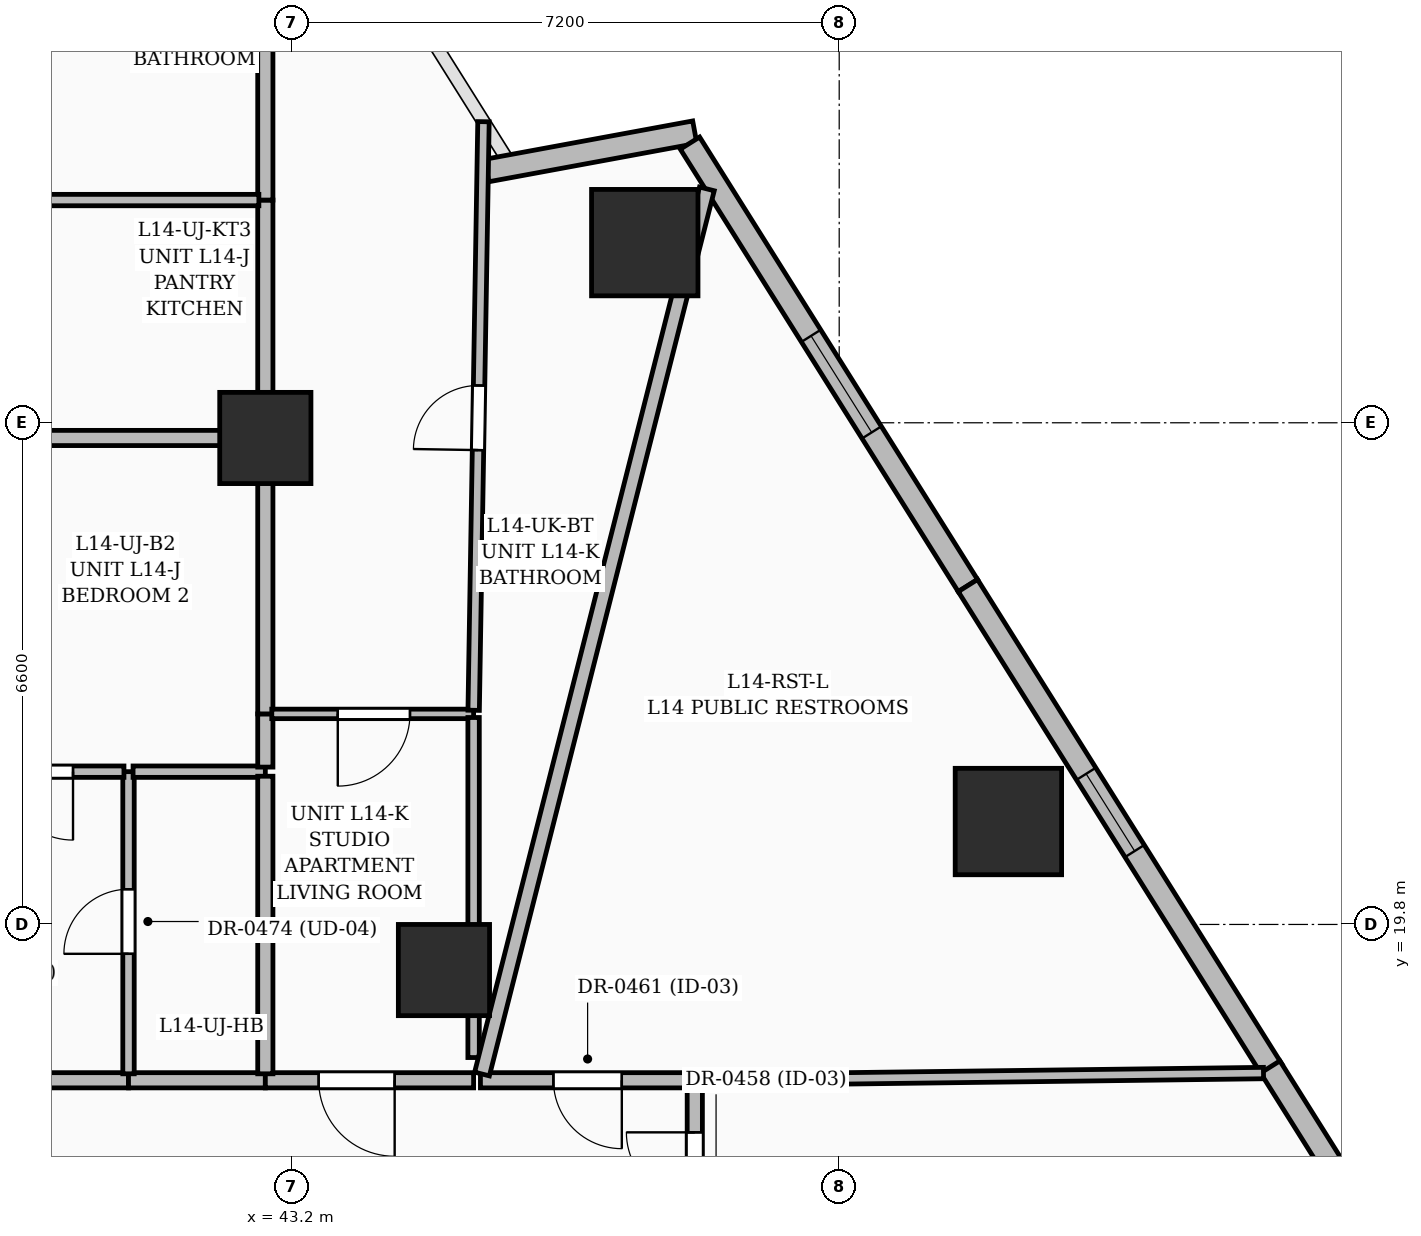
"""IFC4 building model, lengths in metres.
Left out: names, types, materials, properties, quantities, classifications, styles, units other than length and angle.
Written with IfcOpenShell. Run it as: python <this file> out.ifc"""

import sys

from ifc_helpers import new_model, si_unit, direction, frame, frame_2d, origin, origin_2d, place, context, subcontext, project, spatial, rectangle, extrude, element, fill, save


model = new_model("IFC4")
c1 = context("Model", 3, precision=1e-05, world=origin(), true_north=direction((0.0, 1.0)))
c2 = subcontext(c1, "Body", "Model", "MODEL_VIEW")
j1 = project(units=[si_unit("LENGTHUNIT", "METRE"), si_unit("PLANEANGLEUNIT", "RADIAN")], contexts=[c1])
p1 = place(None, origin())
s1 = spatial("IfcSite", under=j1, at=p1, CompositionType="ELEMENT")
p2 = place(p1, origin())
s2 = spatial("IfcBuilding", under=s1, at=p2, CompositionType="ELEMENT")
p3 = place(p2, frame((0.0, 0.0, 60.6)))
s3 = spatial("IfcBuildingStorey", under=s2, at=p3, CompositionType="ELEMENT", Elevation=60.6)
for number, where, z_axis, x_axis in (
    (1, (45.2, 19.2, 0.0), (0.0, 0.0, 1.0), (1.0, 0.0, 0.0)),
    (2, (42.85, 26.2, 0.0), (0.0, 0.0, 1.0), (1.0, 0.0, 0.0)),
):
    element("IfcColumn", number, at=place(p3, frame(where, z_axis=z_axis, x_axis=x_axis)), inside=s3, PredefinedType="COLUMN", context=c2, shape_type="SweptSolid", body=[
        extrude(rectangle(XDim=1.2, YDim=1.2, at=origin_2d()), origin(), (0.0, 0.0, 1.0), 3.6),
    ])
for number, where, z_axis, x_axis in (
    (3, (52.626, 21.154, 0.0), (0.0, 0.0, 1.0), (1.0, 0.0, 0.0)),
    (4, (47.842, 28.77, 0.0), (0.0, 0.0, 1.0), (1.0, 0.0, 0.0)),
):
    element("IfcColumn", number, at=place(p3, frame(where, z_axis=z_axis, x_axis=x_axis)), inside=s3, PredefinedType="COLUMN", context=c2, shape_type="SweptSolid", body=[
        extrude(rectangle(XDim=1.4, YDim=1.4, at=origin_2d()), origin(), (0.0, 0.0, 1.0), 3.6),
    ])
p4 = place(p3, frame((45.763, 29.719, 0.0), z_axis=(0.0, 0.0, 1.0), x_axis=(0.983400490727, 0.181448270416, 0.0)))
e5 = element("IfcWall", 5, at=p4, inside=s3, PredefinedType="SOLIDWALL", context=c2, shape_type="SweptSolid", body=[
    extrude(rectangle(XDim=2.782, YDim=0.3, at=frame_2d((1.391, 0.0))), origin(), (0.0, 0.0, 1.0), 2.375),
])
p5 = place(p3, frame((48.436, 30.08, 0.0), z_axis=(0.0, 0.0, 1.0), x_axis=(0.531916220619, -0.846796985258, 0.0)))
e6 = element("IfcWall", 6, at=p5, inside=s3, PredefinedType="SOLIDWALL", context=c2, shape_type="SweptSolid", body=[
    extrude(rectangle(XDim=6.874, YDim=0.3, at=frame_2d((3.437, 0.0))), origin(), (0.0, 0.0, 1.0), 3.35),
])
p6 = place(p5, frame((2.995, 0.0, 0.6)))
e7 = element("IfcOpeningElement", 7, at=p6, cuts=e6, PredefinedType="OPENING", context=c2, shape_type="SweptSolid", body=[
    extrude(rectangle(XDim=1.5, YDim=2.1, at=frame_2d((0.75, 1.05))), frame((0.0, 0.16, 0.0), z_axis=(0.0, -1.0, 0.0), x_axis=(1.0, 0.0, 0.0)), (0.0, 0.0, 1.0), 0.32),
])
p7 = place(p3, frame((52.093, 24.259, 0.0), z_axis=(0.0, 0.0, 1.0), x_axis=(0.531905989854, -0.846803411635, 0.0)))
e8 = element("IfcWall", 8, at=p7, inside=s3, PredefinedType="SOLIDWALL", context=c2, shape_type="SweptSolid", body=[
    extrude(rectangle(XDim=7.532, YDim=0.3, at=frame_2d((3.766, 0.0))), origin(), (0.0, 0.0, 1.0), 3.35),
])
p8 = place(p7, frame((2.925, 0.0, 0.8)))
e9 = element("IfcOpeningElement", 9, at=p8, cuts=e8, PredefinedType="OPENING", context=c2, shape_type="SweptSolid", body=[
    extrude(rectangle(XDim=1.2, YDim=1.8, at=frame_2d((0.6, 0.9))), frame((0.0, 0.16, 0.0), z_axis=(0.0, -1.0, 0.0), x_axis=(1.0, 0.0, 0.0)), (0.0, 0.0, 1.0), 0.32),
])
p9 = place(p3, frame((56.071, 17.925, 0.0), z_axis=(0.0, 0.0, 1.0), x_axis=(0.531906470689, -0.846803109607, 0.0)))
e10 = element("IfcWall", 10, at=p9, inside=s3, PredefinedType="SOLIDWALL", context=c2, shape_type="SweptSolid", body=[
    extrude(rectangle(XDim=6.829, YDim=0.3, at=frame_2d((3.415, 0.0))), origin(), (0.0, 0.0, 1.0), 3.35),
])
p10 = place(p9, frame((2.0, 0.0, 0.6)))
e11 = element("IfcOpeningElement", 11, at=p10, cuts=e10, PredefinedType="OPENING", context=c2, shape_type="SweptSolid", body=[
    extrude(rectangle(XDim=2.4, YDim=2.1, at=frame_2d((1.2, 1.05))), frame((0.0, 0.16, 0.0), z_axis=(0.0, -1.0, 0.0), x_axis=(1.0, 0.0, 0.0)), (0.0, 0.0, 1.0), 0.32),
])
p11 = place(p3, frame((48.5, 15.48, 0.0), z_axis=(0.0, 0.0, 1.0), x_axis=(0.0, 1.0, 0.0)))
e12 = element("IfcWall", 12, at=p11, inside=s3, PredefinedType="PARTITIONING", context=c2, shape_type="SweptSolid", body=[
    extrude(rectangle(XDim=2.27, YDim=0.2, at=frame_2d((1.135, 0.0))), origin(), (0.0, 0.0, 1.0), 2.279),
])
p12 = place(p11, frame((0.685, 0.0, 0.0)))
e13 = element("IfcOpeningElement", 13, at=p12, cuts=e12, PredefinedType="OPENING", context=c2, shape_type="SweptSolid", body=[
    extrude(rectangle(XDim=0.9, YDim=2.1, at=frame_2d((0.45, 1.05))), frame((0.0, 0.11, 0.0), z_axis=(0.0, -1.0, 0.0), x_axis=(1.0, 0.0, 0.0)), (0.0, 0.0, 1.0), 0.22),
])
p13 = place(p3, frame((41.05, 17.75, 0.0), z_axis=(0.0, 0.0, 1.0), x_axis=(-1.0, 0.0, 0.0)))
e14 = element("IfcWall", 14, at=p13, inside=s3, PredefinedType="PARTITIONING", context=c2, shape_type="SweptSolid", body=[
    extrude(rectangle(XDim=5.48, YDim=0.2, at=frame_2d((2.74, 0.0))), origin(), (0.0, 0.0, 1.0), 3.35),
])
p14 = place(p13, frame((2.18, 0.0, 0.0)))
e15 = element("IfcOpeningElement", 15, at=p14, cuts=e14, PredefinedType="OPENING", context=c2, shape_type="SweptSolid", body=[
    extrude(rectangle(XDim=1.0, YDim=2.2, at=frame_2d((0.5, 1.1))), frame((0.0, 0.11, 0.0), z_axis=(0.0, -1.0, 0.0), x_axis=(1.0, 0.0, 0.0)), (0.0, 0.0, 1.0), 0.22),
])
p15 = place(p3, frame((42.85, 17.75, 0.0), z_axis=(0.0, 0.0, 1.0), x_axis=(-1.0, 0.0, 0.0)))
e16 = element("IfcWall", 16, at=p15, inside=s3, PredefinedType="PARTITIONING", context=c2, shape_type="SweptSolid", body=[
    extrude(rectangle(XDim=1.8, YDim=0.2, at=frame_2d((0.9, 0.0))), origin(), (0.0, 0.0, 1.0), 3.35),
])
p16 = place(p3, frame((45.59, 17.75, 0.0), z_axis=(0.0, 0.0, 1.0), x_axis=(-1.0, 0.0, 0.0)))
e17 = element("IfcWall", 17, at=p16, inside=s3, PredefinedType="PARTITIONING", context=c2, shape_type="SweptSolid", body=[
    extrude(rectangle(XDim=2.74, YDim=0.2, at=frame_2d((1.37, 0.0))), origin(), (0.0, 0.0, 1.0), 2.309),
])
p17 = place(p16, frame((1.039, 0.0, 0.0)))
e18 = element("IfcOpeningElement", 18, at=p17, cuts=e17, PredefinedType="OPENING", context=c2, shape_type="SweptSolid", body=[
    extrude(rectangle(XDim=1.0, YDim=2.2, at=frame_2d((0.5, 1.1))), frame((0.0, 0.11, 0.0), z_axis=(0.0, -1.0, 0.0), x_axis=(1.0, 0.0, 0.0)), (0.0, 0.0, 1.0), 0.22),
])
p18 = place(p3, frame((48.415, 17.75, 0.0), z_axis=(0.0, 0.0, 1.0), x_axis=(-1.0, 0.0, 0.0)))
e19 = element("IfcWall", 19, at=p18, inside=s3, PredefinedType="PARTITIONING", context=c2, shape_type="SweptSolid", body=[
    extrude(rectangle(XDim=2.735, YDim=0.2, at=frame_2d((1.368, 0.0))), origin(), (0.0, 0.0, 1.0), 2.309),
])
p19 = place(p18, frame((0.875, 0.0, 0.0)))
e20 = element("IfcOpeningElement", 20, at=p19, cuts=e19, PredefinedType="OPENING", context=c2, shape_type="SweptSolid", body=[
    extrude(rectangle(XDim=0.9, YDim=2.1, at=frame_2d((0.45, 1.05))), frame((0.0, 0.11, 0.0), z_axis=(0.0, -1.0, 0.0), x_axis=(1.0, 0.0, 0.0)), (0.0, 0.0, 1.0), 0.22),
])
p20 = place(p3, frame((55.982, 17.845, 0.0), z_axis=(0.0, 0.0, 1.0), x_axis=(-0.999919274462, -0.012706083592, 0.0)))
e21 = element("IfcWall", 21, at=p20, inside=s3, PredefinedType="PARTITIONING", context=c2, shape_type="SweptSolid", body=[
    extrude(rectangle(XDim=7.397, YDim=0.15, at=frame_2d((3.699, 0.0))), origin(), (0.0, 0.0, 1.0), 2.279),
])
p21 = place(p3, frame((41.05, 17.835, 0.0), z_axis=(0.0, 0.0, 1.0), x_axis=(0.0, 1.0, 0.0)))
e22 = element("IfcWall", 22, at=p21, inside=s3, PredefinedType="PARTITIONING", context=c2, shape_type="SweptSolid", body=[
    extrude(rectangle(XDim=3.975, YDim=0.15, at=frame_2d((1.988, 0.0))), origin(), (0.0, 0.0, 1.0), 3.35),
])
p22 = place(p21, frame((1.579, 0.0, 0.0)))
e23 = element("IfcOpeningElement", 23, at=p22, cuts=e22, PredefinedType="OPENING", context=c2, shape_type="SweptSolid", body=[
    extrude(rectangle(XDim=0.85, YDim=2.1, at=frame_2d((0.425, 1.05))), frame((0.0, 0.085, 0.0), z_axis=(0.0, -1.0, 0.0), x_axis=(1.0, 0.0, 0.0)), (0.0, 0.0, 1.0), 0.17),
])
p23 = place(p3, frame((40.99, 21.81, 0.0), z_axis=(0.0, 0.0, 1.0), x_axis=(-1.0, 0.0, 0.0)))
e24 = element("IfcWall", 24, at=p23, inside=s3, PredefinedType="PARTITIONING", context=c2, shape_type="SweptSolid", body=[
    extrude(rectangle(XDim=2.3, YDim=0.15, at=frame_2d((1.15, 0.0))), origin(), (0.0, 0.0, 1.0), 3.35),
])
p24 = place(p23, frame((0.67, 0.0, 0.0)))
e25 = element("IfcOpeningElement", 25, at=p24, cuts=e24, PredefinedType="OPENING", context=c2, shape_type="SweptSolid", body=[
    extrude(rectangle(XDim=0.9, YDim=2.15, at=frame_2d((0.45, 1.075))), frame((0.0, 0.085, 0.0), z_axis=(0.0, -1.0, 0.0), x_axis=(1.0, 0.0, 0.0)), (0.0, 0.0, 1.0), 0.17),
])
p25 = place(p3, frame((42.85, 21.81, 0.0), z_axis=(0.0, 0.0, 1.0), x_axis=(-1.0, 0.0, 0.0)))
e26 = element("IfcWall", 26, at=p25, inside=s3, PredefinedType="PARTITIONING", context=c2, shape_type="SweptSolid", body=[
    extrude(rectangle(XDim=1.74, YDim=0.15, at=frame_2d((0.87, 0.0))), origin(), (0.0, 0.0, 1.0), 3.35),
])
p26 = place(p3, frame((42.85, 17.835, 0.0), z_axis=(0.0, 0.0, 1.0), x_axis=(0.0, 1.0, 0.0)))
e27 = element("IfcWall", 27, at=p26, inside=s3, PredefinedType="PARTITIONING", context=c2, shape_type="SweptSolid", body=[
    extrude(rectangle(XDim=3.915, YDim=0.2, at=frame_2d((1.958, 0.0))), origin(), (0.0, 0.0, 1.0), 3.35),
])
p27 = place(p3, frame((42.85, 21.87, 0.0), z_axis=(0.0, 0.0, 1.0), x_axis=(0.0, 1.0, 0.0)))
e28 = element("IfcWall", 28, at=p27, inside=s3, PredefinedType="PARTITIONING", context=c2, shape_type="SweptSolid", body=[
    extrude(rectangle(XDim=0.7, YDim=0.2, at=frame_2d((0.35, 0.0))), origin(), (0.0, 0.0, 1.0), 3.35),
])
p28 = place(p3, frame((42.85, 22.57, 0.0), z_axis=(0.0, 0.0, 1.0), x_axis=(0.0, 1.0, 0.0)))
e29 = element("IfcWall", 29, at=p28, inside=s3, PredefinedType="PARTITIONING", context=c2, shape_type="SweptSolid", body=[
    extrude(rectangle(XDim=3.63, YDim=0.2, at=frame_2d((1.815, 0.0))), origin(), (0.0, 0.0, 1.0), 2.309),
])
p29 = place(p3, frame((42.765, 26.2, 0.0), z_axis=(0.0, 0.0, 1.0), x_axis=(-1.0, 0.0, 0.0)))
e30 = element("IfcWall", 30, at=p29, inside=s3, PredefinedType="PARTITIONING", context=c2, shape_type="SweptSolid", body=[
    extrude(rectangle(XDim=2.855, YDim=0.2, at=frame_2d((1.427, 0.0))), origin(), (0.0, 0.0, 1.0), 2.37),
])
p30 = place(p3, frame((45.59, 22.57, 0.0), z_axis=(0.0, 0.0, 1.0), x_axis=(-1.0, 0.0, 0.0)))
e31 = element("IfcWall", 31, at=p30, inside=s3, PredefinedType="PARTITIONING", context=c2, shape_type="SweptSolid", body=[
    extrude(rectangle(XDim=2.655, YDim=0.125, at=frame_2d((1.328, 0.0))), origin(), (0.0, 0.0, 1.0), 2.309),
])
p31 = place(p30, frame((0.837, 0.0, 0.0)))
e32 = element("IfcOpeningElement", 32, at=p31, cuts=e31, PredefinedType="OPENING", context=c2, shape_type="SweptSolid", body=[
    extrude(rectangle(XDim=0.95, YDim=2.2, at=frame_2d((0.475, 1.1))), frame((0.0, 0.072, 0.0), z_axis=(0.0, -1.0, 0.0), x_axis=(1.0, 0.0, 0.0)), (0.0, 0.0, 1.0), 0.145),
])
p32 = place(p3, frame((45.59, 18.049, 0.0), z_axis=(0.0, 0.0, 1.0), x_axis=(0.0, 1.0, 0.0)))
e33 = element("IfcWall", 33, at=p32, inside=s3, PredefinedType="PARTITIONING", context=c2, shape_type="SweptSolid", body=[
    extrude(rectangle(XDim=4.473, YDim=0.15, at=frame_2d((2.237, 0.0))), origin(), (0.0, 0.0, 1.0), 2.279),
])
p33 = place(p3, frame((45.591, 22.617, 0.0), z_axis=(0.0, 0.0, 1.0), x_axis=(0.016675907723, 0.999860947383, 0.0)))
e34 = element("IfcWall", 34, at=p33, inside=s3, PredefinedType="PARTITIONING", context=c2, shape_type="SweptSolid", body=[
    extrude(rectangle(XDim=7.745, YDim=0.15, at=frame_2d((3.872, 0.0))), origin(), (0.0, 0.0, 1.0), 2.712),
])
p34 = place(p33, frame((3.424, 0.0, 0.0)))
e35 = element("IfcOpeningElement", 35, at=p34, cuts=e34, PredefinedType="OPENING", context=c2, shape_type="SweptSolid", body=[
    extrude(rectangle(XDim=0.85, YDim=2.1, at=frame_2d((0.425, 1.05))), frame((0.0, 0.085, 0.0), z_axis=(0.0, -1.0, 0.0), x_axis=(1.0, 0.0, 0.0)), (0.0, 0.0, 1.0), 0.17),
])
p35 = place(p3, frame((42.85, 29.33, 0.0), z_axis=(0.0, 0.0, 1.0), x_axis=(0.0, -1.0, 0.0)))
e36 = element("IfcWall", 36, at=p35, inside=s3, PredefinedType="PARTITIONING", context=c2, shape_type="SweptSolid", body=[
    extrude(rectangle(XDim=3.13, YDim=0.2, at=frame_2d((1.565, 0.0))), origin(), (0.0, 0.0, 1.0), 2.279),
])
p36 = place(p3, frame((42.85, 32.45, 0.0), z_axis=(0.0, 0.0, 1.0), x_axis=(0.0, -1.0, 0.0)))
e37 = element("IfcWall", 37, at=p36, inside=s3, PredefinedType="PARTITIONING", context=c2, shape_type="SweptSolid", body=[
    extrude(rectangle(XDim=3.12, YDim=0.2, at=frame_2d((1.56, 0.0))), origin(), (0.0, 0.0, 1.0), 2.279),
])
p37 = place(p3, frame((45.701, 17.833, 0.0), z_axis=(0.0, 0.0, 1.0), x_axis=(0.246225051857, 0.969212682458, 0.0)))
e38 = element("IfcWall", 38, at=p37, inside=s3, PredefinedType="PARTITIONING", context=c2, shape_type="SweptSolid", body=[
    extrude(rectangle(XDim=12.014, YDim=0.2, at=frame_2d((6.007, 0.0))), origin(), (0.0, 0.0, 1.0), 2.309),
])
p38 = place(p3, frame((42.765, 29.33, 0.0), z_axis=(0.0, 0.0, 1.0), x_axis=(-1.0, 0.0, 0.0)))
e39 = element("IfcWall", 39, at=p38, inside=s3, PredefinedType="PARTITIONING", context=c2, shape_type="SweptSolid", body=[
    extrude(rectangle(XDim=2.807, YDim=0.15, at=frame_2d((1.404, 0.0))), origin(), (0.0, 0.0, 1.0), 2.279),
])
p39 = place(p6, origin())
e40 = element("IfcWindow", 40, at=p39, inside=s3, PartitioningType="SINGLE_PANEL", PredefinedType="WINDOW", context=c2, shape_type="SweptSolid", body=[
    extrude(rectangle(XDim=1.5, YDim=2.1, at=frame_2d((0.75, 1.05))), frame((0.0, 0.03, 0.0), z_axis=(0.0, -1.0, 0.0), x_axis=(1.0, 0.0, 0.0)), (0.0, 0.0, 1.0), 0.06),
])
fill(e7, e40)
p40 = place(p8, origin())
e41 = element("IfcWindow", 41, at=p40, inside=s3, PartitioningType="SINGLE_PANEL", PredefinedType="WINDOW", context=c2, shape_type="SweptSolid", body=[
    extrude(rectangle(XDim=1.2, YDim=1.8, at=frame_2d((0.6, 0.9))), frame((0.0, 0.03, 0.0), z_axis=(0.0, -1.0, 0.0), x_axis=(1.0, 0.0, 0.0)), (0.0, 0.0, 1.0), 0.06),
])
fill(e9, e41)
p41 = place(p12, origin())
e42 = element("IfcDoor", 42, at=p41, inside=s3, OperationType="SINGLE_SWING_RIGHT", PredefinedType="DOOR", context=c2, shape_type="SweptSolid", body=[
    extrude(rectangle(XDim=0.9, YDim=2.1, at=frame_2d((0.45, 1.05))), frame((0.0, 0.025, 0.0), z_axis=(0.0, -1.0, 0.0), x_axis=(1.0, 0.0, 0.0)), (0.0, 0.0, 1.0), 0.05),
])
fill(e13, e42)
p42 = place(p19, origin())
e43 = element("IfcDoor", 43, at=p42, inside=s3, OperationType="SINGLE_SWING_LEFT", PredefinedType="DOOR", context=c2, shape_type="SweptSolid", body=[
    extrude(rectangle(XDim=0.9, YDim=2.1, at=frame_2d((0.45, 1.05))), frame((0.0, 0.025, 0.0), z_axis=(0.0, -1.0, 0.0), x_axis=(1.0, 0.0, 0.0)), (0.0, 0.0, 1.0), 0.05),
])
fill(e20, e43)
p43 = place(p22, origin())
e44 = element("IfcDoor", 44, at=p43, inside=s3, OperationType="SINGLE_SWING_LEFT", PredefinedType="DOOR", context=c2, shape_type="SweptSolid", body=[
    extrude(rectangle(XDim=0.85, YDim=2.1, at=frame_2d((0.425, 1.05))), frame((0.0, 0.025, 0.0), z_axis=(0.0, -1.0, 0.0), x_axis=(1.0, 0.0, 0.0)), (0.0, 0.0, 1.0), 0.05),
])
fill(e23, e44)
p44 = place(p24, origin())
e45 = element("IfcDoor", 45, at=p44, inside=s3, OperationType="SINGLE_SWING_LEFT", PredefinedType="DOOR", context=c2, shape_type="SweptSolid", body=[
    extrude(rectangle(XDim=0.9, YDim=2.15, at=frame_2d((0.45, 1.075))), frame((0.0, 0.025, 0.0), z_axis=(0.0, -1.0, 0.0), x_axis=(1.0, 0.0, 0.0)), (0.0, 0.0, 1.0), 0.05),
])
fill(e25, e45)
p45 = place(p17, origin())
e46 = element("IfcDoor", 46, at=p45, inside=s3, OperationType="SINGLE_SWING_LEFT", PredefinedType="DOOR", context=c2, shape_type="SweptSolid", body=[
    extrude(rectangle(XDim=1.0, YDim=2.2, at=frame_2d((0.5, 1.1))), frame((0.0, 0.025, 0.0), z_axis=(0.0, -1.0, 0.0), x_axis=(1.0, 0.0, 0.0)), (0.0, 0.0, 1.0), 0.05),
])
fill(e18, e46)
p46 = place(p31, origin())
e47 = element("IfcDoor", 47, at=p46, inside=s3, OperationType="SINGLE_SWING_RIGHT", PredefinedType="DOOR", context=c2, shape_type="SweptSolid", body=[
    extrude(rectangle(XDim=0.95, YDim=2.2, at=frame_2d((0.475, 1.1))), frame((0.0, 0.025, 0.0), z_axis=(0.0, -1.0, 0.0), x_axis=(1.0, 0.0, 0.0)), (0.0, 0.0, 1.0), 0.05),
])
fill(e32, e47)
p47 = place(p34, origin())
e48 = element("IfcDoor", 48, at=p47, inside=s3, OperationType="SINGLE_SWING_LEFT", PredefinedType="DOOR", context=c2, shape_type="SweptSolid", body=[
    extrude(rectangle(XDim=0.85, YDim=2.1, at=frame_2d((0.425, 1.05))), frame((0.0, 0.025, 0.0), z_axis=(0.0, -1.0, 0.0), x_axis=(1.0, 0.0, 0.0)), (0.0, 0.0, 1.0), 0.05),
])
fill(e35, e48)
save(model, sys.argv[1])
